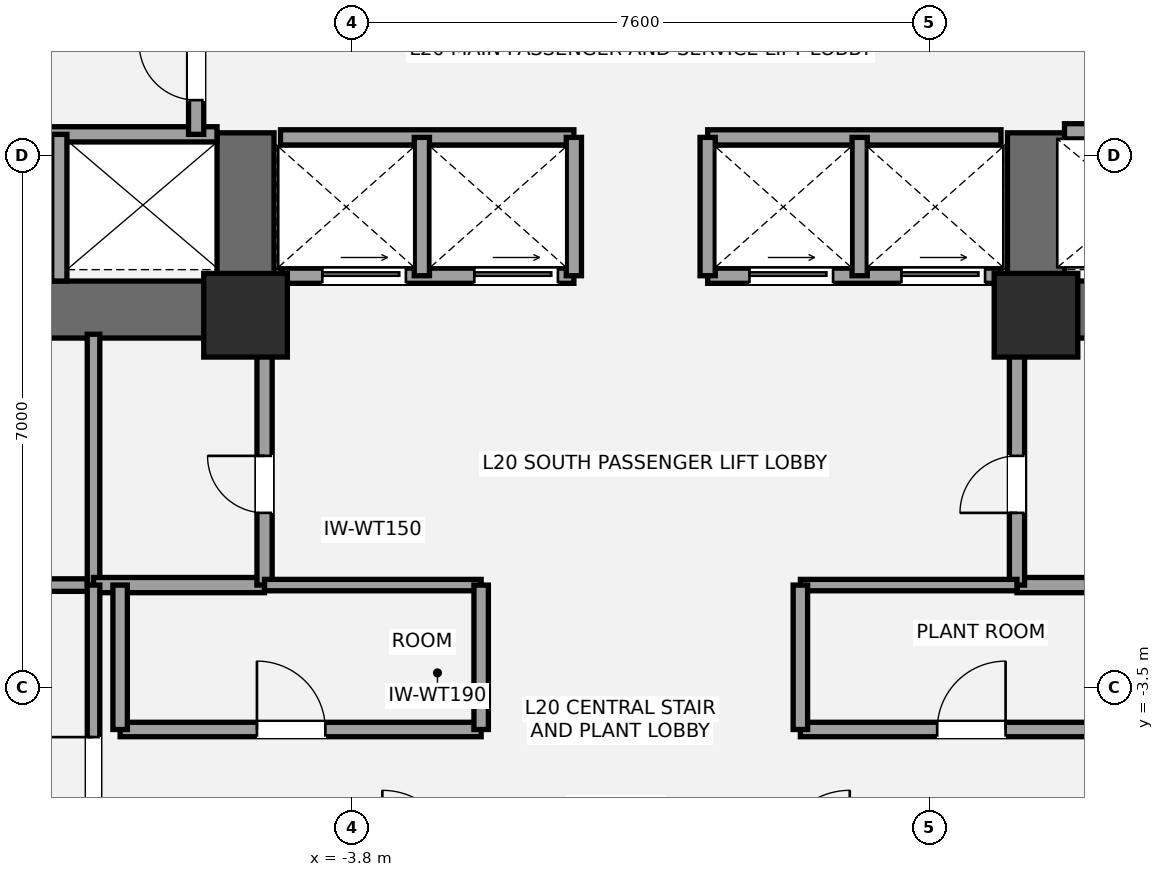
"""IFC4 building model, lengths in metres.
Left out: names, types, materials, properties, quantities, classifications, styles, units other than length and angle.
Written with IfcOpenShell. Run it as: python <this file> out.ifc"""

import sys

from ifc_helpers import new_model, si_unit, direction, frame, frame_2d, origin, origin_2d, place, context, subcontext, project, spatial, rectangle, extrude, element, fill, save


model = new_model("IFC4")
c1 = context("Model", 3, precision=1e-05, world=origin(), true_north=direction((0.0, 1.0)))
c2 = subcontext(c1, "Body", "Model", "MODEL_VIEW")
j1 = project(units=[si_unit("LENGTHUNIT", "METRE"), si_unit("PLANEANGLEUNIT", "RADIAN")], contexts=[c1])
p1 = place(None, origin())
s1 = spatial("IfcSite", under=j1, at=p1, CompositionType="ELEMENT")
p2 = place(p1, origin())
s2 = spatial("IfcBuilding", under=s1, at=p2, CompositionType="ELEMENT")
p3 = place(p2, frame((0.0, 0.0, 77.4)))
s3 = spatial("IfcBuildingStorey", under=s2, at=p3, CompositionType="ELEMENT", Elevation=77.4)
p4 = place(p3, frame((-4.825, 1.475, 0.0), z_axis=(0.0, 0.0, 1.0), x_axis=(-1.0, 0.0, 0.0)))
e1 = element("IfcWall", 1, at=p4, inside=s3, PredefinedType="SHEAR", context=c2, shape_type="SweptSolid", body=[
    extrude(rectangle(XDim=9.075, YDim=0.75, at=frame_2d((4.538, 0.0))), origin(), (0.0, 0.0, 1.0), 4.5),
])
p5 = place(p4, frame((5.355, 0.0, 0.0)))
e2 = element("IfcOpeningElement", 2, at=p5, cuts=e1, PredefinedType="OPENING", context=c2, shape_type="SweptSolid", body=[
    extrude(rectangle(XDim=1.05, YDim=2.15, at=frame_2d((0.525, 1.075))), frame((0.0, 0.385, 0.0), z_axis=(0.0, -1.0, 0.0), x_axis=(1.0, 0.0, 0.0)), (0.0, 0.0, 1.0), 0.77),
])
p6 = place(p4, frame((3.805, 0.0, 0.0)))
e3 = element("IfcOpeningElement", 3, at=p6, cuts=e1, PredefinedType="OPENING", context=c2, shape_type="SweptSolid", body=[
    extrude(rectangle(XDim=1.1, YDim=2.2, at=frame_2d((0.55, 1.1))), frame((0.0, 0.385, 0.0), z_axis=(0.0, -1.0, 0.0), x_axis=(1.0, 0.0, 0.0)), (0.0, 0.0, 1.0), 0.77),
])
p7 = place(p3, frame((-5.2, 1.1, 0.0), z_axis=(0.0, 0.0, 1.0), x_axis=(0.0, 1.0, 0.0)))
e4 = element("IfcWall", 4, at=p7, inside=s3, PredefinedType="SHEAR", context=c2, shape_type="SweptSolid", body=[
    extrude(rectangle(XDim=2.7, YDim=0.75, at=frame_2d((1.35, 0.0))), origin(), (0.0, 0.0, 1.0), 4.5),
])
p8 = place(p3, frame((13.9, 1.475, 0.0), z_axis=(0.0, 0.0, 1.0), x_axis=(-1.0, 0.0, 0.0)))
e5 = element("IfcWall", 5, at=p8, inside=s3, PredefinedType="SHEAR", context=c2, shape_type="SweptSolid", body=[
    extrude(rectangle(XDim=9.075, YDim=0.75, at=frame_2d((4.538, 0.0))), origin(), (0.0, 0.0, 1.0), 4.5),
])
p9 = place(p8, frame((2.67, 0.0, 0.0)))
e6 = element("IfcOpeningElement", 6, at=p9, cuts=e5, PredefinedType="OPENING", context=c2, shape_type="SweptSolid", body=[
    extrude(rectangle(XDim=1.05, YDim=2.15, at=frame_2d((0.525, 1.075))), frame((0.0, 0.385, 0.0), z_axis=(0.0, -1.0, 0.0), x_axis=(1.0, 0.0, 0.0)), (0.0, 0.0, 1.0), 0.77),
])
p10 = place(p8, frame((4.55, 0.0, 0.0)))
e7 = element("IfcOpeningElement", 7, at=p10, cuts=e5, PredefinedType="OPENING", context=c2, shape_type="SweptSolid", body=[
    extrude(rectangle(XDim=1.1, YDim=2.2, at=frame_2d((0.55, 1.1))), frame((0.0, 0.385, 0.0), z_axis=(0.0, -1.0, 0.0), x_axis=(1.0, 0.0, 0.0)), (0.0, 0.0, 1.0), 0.77),
])
p11 = place(p3, frame((5.2, 1.1, 0.0), z_axis=(0.0, 0.0, 1.0), x_axis=(0.0, 1.0, 0.0)))
e8 = element("IfcWall", 8, at=p11, inside=s3, PredefinedType="SHEAR", context=c2, shape_type="SweptSolid", body=[
    extrude(rectangle(XDim=2.7, YDim=0.75, at=frame_2d((1.35, 0.0))), origin(), (0.0, 0.0, 1.0), 4.5),
])
for number, where, z_axis, x_axis in (
    (9, (-5.2, 1.4, 0.0), (0.0, 0.0, 1.0), (1.0, 0.0, 0.0)),
    (10, (5.2, 1.4, 0.0), (0.0, 0.0, 1.0), (1.0, 0.0, 0.0)),
):
    element("IfcColumn", number, at=place(p3, frame(where, z_axis=z_axis, x_axis=x_axis)), inside=s3, PredefinedType="COLUMN", context=c2, shape_type="SweptSolid", body=[
        extrude(rectangle(XDim=1.1, YDim=1.1, at=origin_2d()), origin(), (0.0, 0.0, 1.0), 4.5),
    ])
p12 = place(p3, frame((-13.45, -2.15, 0.0), z_axis=(0.0, 0.0, 1.0), x_axis=(1.0, 0.0, 0.0)))
e11 = element("IfcWall", 11, at=p12, inside=s3, PredefinedType="PARTITIONING", context=c2, shape_type="SweptSolid", body=[
    extrude(rectangle(XDim=6.25, YDim=0.165, at=frame_2d((3.125, 0.0))), origin(), (0.0, 0.0, 1.0), 3.733),
])
p13 = place(p12, frame((2.6, 0.0, 0.0)))
e12 = element("IfcOpeningElement", 12, at=p13, cuts=e11, PredefinedType="OPENING", context=c2, shape_type="SweptSolid", body=[
    extrude(rectangle(XDim=1.05, YDim=2.15, at=frame_2d((0.525, 1.075))), frame((0.0, 0.093, 0.0), z_axis=(0.0, -1.0, 0.0), x_axis=(1.0, 0.0, 0.0)), (0.0, 0.0, 1.0), 0.185),
])
p14 = place(p3, frame((-7.2, -2.15, 0.0), z_axis=(0.0, 0.0, 1.0), x_axis=(0.0, 1.0, 0.0)))
e13 = element("IfcWall", 13, at=p14, inside=s3, PredefinedType="PARTITIONING", context=c2, shape_type="SweptSolid", body=[
    extrude(rectangle(XDim=3.3, YDim=0.165, at=frame_2d((1.65, 0.0))), origin(), (0.0, 0.0, 1.0), 3.733),
])
p15 = place(p3, frame((-7.2, -2.15, 0.0), z_axis=(0.0, 0.0, 1.0), x_axis=(1.0, 0.0, 0.0)))
e14 = element("IfcWall", 14, at=p15, inside=s3, PredefinedType="SOLIDWALL", context=c2, shape_type="SweptSolid", body=[
    extrude(rectangle(XDim=2.25, YDim=0.2, at=frame_2d((1.125, 0.0))), origin(), (0.0, 0.0, 1.0), 2.47),
])
p16 = place(p3, frame((-4.95, -2.15, 0.0), z_axis=(0.0, 0.0, 1.0), x_axis=(0.0, 1.0, 0.0)))
e15 = element("IfcWall", 15, at=p16, inside=s3, PredefinedType="SOLIDWALL", context=c2, shape_type="SweptSolid", body=[
    extrude(rectangle(XDim=3.3, YDim=0.2, at=frame_2d((1.65, 0.0))), origin(), (0.0, 0.0, 1.0), 2.47),
])
p17 = place(p16, frame((0.95, 0.0, 0.0)))
e16 = element("IfcOpeningElement", 16, at=p17, cuts=e15, PredefinedType="OPENING", context=c2, shape_type="SweptSolid", body=[
    extrude(rectangle(XDim=0.75, YDim=2.1, at=frame_2d((0.375, 1.05))), frame((0.0, 0.11, 0.0), z_axis=(0.0, -1.0, 0.0), x_axis=(1.0, 0.0, 0.0)), (0.0, 0.0, 1.0), 0.22),
])
p18 = place(p3, frame((4.95, -2.15, 0.0), z_axis=(0.0, 0.0, 1.0), x_axis=(1.0, 0.0, 0.0)))
e17 = element("IfcWall", 17, at=p18, inside=s3, PredefinedType="SOLIDWALL", context=c2, shape_type="SweptSolid", body=[
    extrude(rectangle(XDim=2.25, YDim=0.2, at=frame_2d((1.125, 0.0))), origin(), (0.0, 0.0, 1.0), 2.47),
])
p19 = place(p3, frame((4.95, -2.15, 0.0), z_axis=(0.0, 0.0, 1.0), x_axis=(0.0, 1.0, 0.0)))
e18 = element("IfcWall", 18, at=p19, inside=s3, PredefinedType="SOLIDWALL", context=c2, shape_type="SweptSolid", body=[
    extrude(rectangle(XDim=3.3, YDim=0.2, at=frame_2d((1.65, 0.0))), origin(), (0.0, 0.0, 1.0), 2.47),
])
p20 = place(p19, frame((0.95, 0.0, 0.0)))
e19 = element("IfcOpeningElement", 19, at=p20, cuts=e18, PredefinedType="OPENING", context=c2, shape_type="SweptSolid", body=[
    extrude(rectangle(XDim=0.75, YDim=2.1, at=frame_2d((0.375, 1.05))), frame((0.0, 0.11, 0.0), z_axis=(0.0, -1.0, 0.0), x_axis=(1.0, 0.0, 0.0)), (0.0, 0.0, 1.0), 0.22),
])
p21 = place(p3, frame((-9.78, 3.78, 0.0), z_axis=(0.0, 0.0, 1.0), x_axis=(1.0, 0.0, 0.0)))
e20 = element("IfcWall", 20, at=p21, inside=s3, PredefinedType="SOLIDWALL", context=c2, shape_type="SweptSolid", body=[
    extrude(rectangle(XDim=4.205, YDim=0.2, at=frame_2d((2.103, 0.0))), origin(), (0.0, 0.0, 1.0), 4.28),
])
p22 = place(p3, frame((-7.65, 1.85, 0.0), z_axis=(0.0, 0.0, 1.0), x_axis=(0.0, 1.0, 0.0)))
e21 = element("IfcWall", 21, at=p22, inside=s3, PredefinedType="SOLIDWALL", context=c2, shape_type="SweptSolid", body=[
    extrude(rectangle(XDim=1.93, YDim=0.2, at=frame_2d((0.965, 0.0))), origin(), (0.0, 0.0, 1.0), 4.28),
])
p23 = place(p3, frame((-5.85, 3.78, 0.0), z_axis=(0.0, 0.0, 1.0), x_axis=(0.0, 1.0, 0.0)))
e22 = element("IfcWall", 22, at=p23, inside=s3, PredefinedType="SOLIDWALL", context=c2, shape_type="SweptSolid", body=[
    extrude(rectangle(XDim=1.69, YDim=0.2, at=frame_2d((0.845, 0.0))), origin(), (0.0, 0.0, 1.0), 4.28),
])
p24 = place(p23, frame((0.45, 0.0, 0.0)))
e23 = element("IfcOpeningElement", 23, at=p24, cuts=e22, PredefinedType="OPENING", context=c2, shape_type="SweptSolid", body=[
    extrude(rectangle(XDim=0.75, YDim=2.1, at=frame_2d((0.375, 1.05))), frame((0.0, 0.11, 0.0), z_axis=(0.0, -1.0, 0.0), x_axis=(1.0, 0.0, 0.0)), (0.0, 0.0, 1.0), 0.22),
])
p25 = place(p3, frame((5.575, 3.82, 0.0), z_axis=(0.0, 0.0, 1.0), x_axis=(1.0, 0.0, 0.0)))
e24 = element("IfcWall", 24, at=p25, inside=s3, PredefinedType="SOLIDWALL", context=c2, shape_type="SweptSolid", body=[
    extrude(rectangle(XDim=4.205, YDim=0.2, at=frame_2d((2.103, 0.0))), origin(), (0.0, 0.0, 1.0), 4.28),
])
p26 = place(p25, frame((0.65, 0.0, 0.0)))
e25 = element("IfcOpeningElement", 25, at=p26, cuts=e24, PredefinedType="OPENING", context=c2, shape_type="SweptSolid", body=[
    extrude(rectangle(XDim=1.2, YDim=2.2, at=frame_2d((0.6, 1.1))), frame((0.0, 0.11, 0.0), z_axis=(0.0, -1.0, 0.0), x_axis=(1.0, 0.0, 0.0)), (0.0, 0.0, 1.0), 0.22),
])
p27 = place(p3, frame((-4.74, 1.92, 0.0), z_axis=(0.0, 0.0, 1.0), x_axis=(1.0, 0.0, 0.0)))
e26 = element("IfcWall", 26, at=p27, inside=s3, PredefinedType="SOLIDWALL", context=c2, shape_type="SweptSolid", body=[
    extrude(rectangle(XDim=3.86, YDim=0.2, at=frame_2d((1.93, 0.0))), origin(), (0.0, 0.0, 1.0), 3.27),
])
p28 = place(p27, frame((0.55, 0.0, 0.0)))
e27 = element("IfcOpeningElement", 27, at=p28, cuts=e26, PredefinedType="OPENING", context=c2, shape_type="SweptSolid", body=[
    extrude(rectangle(XDim=1.1, YDim=2.2, at=frame_2d((0.55, 1.1))), frame((0.0, 0.11, 0.0), z_axis=(0.0, -1.0, 0.0), x_axis=(1.0, 0.0, 0.0)), (0.0, 0.0, 1.0), 0.22),
])
p29 = place(p27, frame((2.55, 0.0, 0.0)))
e28 = element("IfcOpeningElement", 28, at=p29, cuts=e26, PredefinedType="OPENING", context=c2, shape_type="SweptSolid", body=[
    extrude(rectangle(XDim=1.1, YDim=2.2, at=frame_2d((0.55, 1.1))), frame((0.0, 0.11, 0.0), z_axis=(0.0, -1.0, 0.0), x_axis=(1.0, 0.0, 0.0)), (0.0, 0.0, 1.0), 0.22),
])
p30 = place(p3, frame((0.88, 1.92, 0.0), z_axis=(0.0, 0.0, 1.0), x_axis=(1.0, 0.0, 0.0)))
e29 = element("IfcWall", 29, at=p30, inside=s3, PredefinedType="SOLIDWALL", context=c2, shape_type="SweptSolid", body=[
    extrude(rectangle(XDim=3.86, YDim=0.2, at=frame_2d((1.93, 0.0))), origin(), (0.0, 0.0, 1.0), 3.27),
])
p31 = place(p30, frame((0.55, 0.0, 0.0)))
e30 = element("IfcOpeningElement", 30, at=p31, cuts=e29, PredefinedType="OPENING", context=c2, shape_type="SweptSolid", body=[
    extrude(rectangle(XDim=1.1, YDim=2.2, at=frame_2d((0.55, 1.1))), frame((0.0, 0.11, 0.0), z_axis=(0.0, -1.0, 0.0), x_axis=(1.0, 0.0, 0.0)), (0.0, 0.0, 1.0), 0.22),
])
p32 = place(p30, frame((2.55, 0.0, 0.0)))
e31 = element("IfcOpeningElement", 31, at=p32, cuts=e29, PredefinedType="OPENING", context=c2, shape_type="SweptSolid", body=[
    extrude(rectangle(XDim=1.1, YDim=2.2, at=frame_2d((0.55, 1.1))), frame((0.0, 0.11, 0.0), z_axis=(0.0, -1.0, 0.0), x_axis=(1.0, 0.0, 0.0)), (0.0, 0.0, 1.0), 0.22),
])
for number, where, z_axis, x_axis in (
    (32, (-4.74, 3.74, 0.0), (0.0, 0.0, 1.0), (1.0, 0.0, 0.0)),
    (33, (0.88, 3.74, 0.0), (0.0, 0.0, 1.0), (1.0, 0.0, 0.0)),
):
    element("IfcWall", number, at=place(p3, frame(where, z_axis=z_axis, x_axis=x_axis)), inside=s3, PredefinedType="SOLIDWALL", context=c2, shape_type="SweptSolid", body=[
        extrude(rectangle(XDim=3.86, YDim=0.2, at=frame_2d((1.93, 0.0))), origin(), (0.0, 0.0, 1.0), 4.28),
    ])
for number, where, z_axis, x_axis in (
    (34, (-2.88, 1.92, 0.0), (0.0, 0.0, 1.0), (0.0, 1.0, 0.0)),
    (35, (2.88, 1.92, 0.0), (0.0, 0.0, 1.0), (0.0, 1.0, 0.0)),
    (36, (-0.88, 1.92, 0.0), (0.0, 0.0, 1.0), (0.0, 1.0, 0.0)),
    (37, (0.88, 1.92, 0.0), (0.0, 0.0, 1.0), (0.0, 1.0, 0.0)),
):
    element("IfcWall", number, at=place(p3, frame(where, z_axis=z_axis, x_axis=x_axis)), inside=s3, PredefinedType="SOLIDWALL", context=c2, shape_type="SweptSolid", body=[
        extrude(rectangle(XDim=1.82, YDim=0.2, at=frame_2d((0.91, 0.0))), origin(), (0.0, 0.0, 1.0), 4.28),
    ])
p33 = place(p3, frame((-6.85, -4.05, 0.0), z_axis=(0.0, 0.0, 1.0), x_axis=(1.0, 0.0, 0.0)))
e38 = element("IfcWall", 38, at=p33, inside=s3, PredefinedType="PLUMBINGWALL", context=c2, shape_type="SweptSolid", body=[
    extrude(rectangle(XDim=4.75, YDim=0.19, at=frame_2d((2.375, 0.0))), origin(), (0.0, 0.0, 1.0), 2.47),
])
p34 = place(p33, frame((1.8, 0.0, 0.0)))
e39 = element("IfcOpeningElement", 39, at=p34, cuts=e38, PredefinedType="OPENING", context=c2, shape_type="SweptSolid", body=[
    extrude(rectangle(XDim=0.9, YDim=2.1, at=frame_2d((0.45, 1.05))), frame((0.0, 0.105, 0.0), z_axis=(0.0, -1.0, 0.0), x_axis=(1.0, 0.0, 0.0)), (0.0, 0.0, 1.0), 0.21),
])
p35 = place(p3, frame((-4.95, -2.15, 0.0), z_axis=(0.0, 0.0, 1.0), x_axis=(1.0, 0.0, 0.0)))
e40 = element("IfcWall", 40, at=p35, inside=s3, PredefinedType="PLUMBINGWALL", context=c2, shape_type="SweptSolid", body=[
    extrude(rectangle(XDim=2.85, YDim=0.15, at=frame_2d((1.425, 0.0))), origin(), (0.0, 0.0, 1.0), 4.28),
])
for number, where, z_axis, x_axis in (
    (41, (-6.85, -4.05, 0.0), (0.0, 0.0, 1.0), (0.0, 1.0, 0.0)),
    (42, (-2.1, -4.05, 0.0), (0.0, 0.0, 1.0), (0.0, 1.0, 0.0)),
):
    element("IfcWall", number, at=place(p3, frame(where, z_axis=z_axis, x_axis=x_axis)), inside=s3, PredefinedType="PLUMBINGWALL", context=c2, shape_type="SweptSolid", body=[
        extrude(rectangle(XDim=1.9, YDim=0.19, at=frame_2d((0.95, 0.0))), origin(), (0.0, 0.0, 1.0), 4.28),
    ])
p36 = place(p3, frame((2.1, -4.05, 0.0), z_axis=(0.0, 0.0, 1.0), x_axis=(1.0, 0.0, 0.0)))
e43 = element("IfcWall", 43, at=p36, inside=s3, PredefinedType="PLUMBINGWALL", context=c2, shape_type="SweptSolid", body=[
    extrude(rectangle(XDim=4.75, YDim=0.19, at=frame_2d((2.375, 0.0))), origin(), (0.0, 0.0, 1.0), 2.47),
])
p37 = place(p36, frame((1.8, 0.0, 0.0)))
e44 = element("IfcOpeningElement", 44, at=p37, cuts=e43, PredefinedType="OPENING", context=c2, shape_type="SweptSolid", body=[
    extrude(rectangle(XDim=0.9, YDim=2.1, at=frame_2d((0.45, 1.05))), frame((0.0, 0.105, 0.0), z_axis=(0.0, -1.0, 0.0), x_axis=(1.0, 0.0, 0.0)), (0.0, 0.0, 1.0), 0.21),
])
p38 = place(p3, frame((2.1, -2.15, 0.0), z_axis=(0.0, 0.0, 1.0), x_axis=(1.0, 0.0, 0.0)))
e45 = element("IfcWall", 45, at=p38, inside=s3, PredefinedType="PLUMBINGWALL", context=c2, shape_type="SweptSolid", body=[
    extrude(rectangle(XDim=2.85, YDim=0.15, at=frame_2d((1.425, 0.0))), origin(), (0.0, 0.0, 1.0), 4.28),
])
p39 = place(p3, frame((2.1, -4.05, 0.0), z_axis=(0.0, 0.0, 1.0), x_axis=(0.0, 1.0, 0.0)))
e46 = element("IfcWall", 46, at=p39, inside=s3, PredefinedType="PLUMBINGWALL", context=c2, shape_type="SweptSolid", body=[
    extrude(rectangle(XDim=1.9, YDim=0.19, at=frame_2d((0.95, 0.0))), origin(), (0.0, 0.0, 1.0), 4.28),
])
p40 = place(p3, frame((-7.2, -5.8, 0.0), z_axis=(0.0, 0.0, 1.0), x_axis=(0.0, 1.0, 0.0)))
e47 = element("IfcWall", 47, at=p40, inside=s3, PredefinedType="PARTITIONING", context=c2, shape_type="SweptSolid", body=[
    extrude(rectangle(XDim=3.65, YDim=0.165, at=frame_2d((1.825, 0.0))), origin(), (0.0, 0.0, 1.0), 4.28),
])
p41 = place(p40, frame((0.6, 0.0, 0.0)))
e48 = element("IfcOpeningElement", 48, at=p41, cuts=e47, PredefinedType="OPENING", context=c2, shape_type="SweptSolid", body=[
    extrude(rectangle(XDim=1.05, YDim=2.15, at=frame_2d((0.525, 1.075))), frame((0.0, 0.093, 0.0), z_axis=(0.0, -1.0, 0.0), x_axis=(1.0, 0.0, 0.0)), (0.0, 0.0, 1.0), 0.185),
])
p42 = place(p17, origin())
e49 = element("IfcDoor", 49, at=p42, inside=s3, OperationType="SINGLE_SWING_RIGHT", PredefinedType="DOOR", context=c2, shape_type="SweptSolid", body=[
    extrude(rectangle(XDim=0.75, YDim=2.1, at=frame_2d((0.375, 1.05))), frame((0.0, 0.025, 0.0), z_axis=(0.0, -1.0, 0.0), x_axis=(1.0, 0.0, 0.0)), (0.0, 0.0, 1.0), 0.05),
])
fill(e16, e49)
p43 = place(p20, origin())
e50 = element("IfcDoor", 50, at=p43, inside=s3, OperationType="SINGLE_SWING_LEFT", PredefinedType="DOOR", context=c2, shape_type="SweptSolid", body=[
    extrude(rectangle(XDim=0.75, YDim=2.1, at=frame_2d((0.375, 1.05))), frame((0.0, 0.025, 0.0), z_axis=(0.0, -1.0, 0.0), x_axis=(1.0, 0.0, 0.0)), (0.0, 0.0, 1.0), 0.05),
])
fill(e19, e50)
p44 = place(p24, origin())
e51 = element("IfcDoor", 51, at=p44, inside=s3, OperationType="SINGLE_SWING_RIGHT", PredefinedType="DOOR", context=c2, shape_type="SweptSolid", body=[
    extrude(rectangle(XDim=0.75, YDim=2.1, at=frame_2d((0.375, 1.05))), frame((0.0, 0.025, 0.0), z_axis=(0.0, -1.0, 0.0), x_axis=(1.0, 0.0, 0.0)), (0.0, 0.0, 1.0), 0.05),
])
fill(e23, e51)
p45 = place(p28, origin())
e52 = element("IfcDoor", 52, at=p45, inside=s3, OperationType="SLIDING_TO_LEFT", PredefinedType="DOOR", context=c2, shape_type="SweptSolid", body=[
    extrude(rectangle(XDim=1.1, YDim=2.2, at=frame_2d((0.55, 1.1))), frame((0.0, 0.025, 0.0), z_axis=(0.0, -1.0, 0.0), x_axis=(1.0, 0.0, 0.0)), (0.0, 0.0, 1.0), 0.05),
])
fill(e27, e52)
p46 = place(p29, origin())
e53 = element("IfcDoor", 53, at=p46, inside=s3, OperationType="SLIDING_TO_LEFT", PredefinedType="DOOR", context=c2, shape_type="SweptSolid", body=[
    extrude(rectangle(XDim=1.1, YDim=2.2, at=frame_2d((0.55, 1.1))), frame((0.0, 0.025, 0.0), z_axis=(0.0, -1.0, 0.0), x_axis=(1.0, 0.0, 0.0)), (0.0, 0.0, 1.0), 0.05),
])
fill(e28, e53)
p47 = place(p31, origin())
e54 = element("IfcDoor", 54, at=p47, inside=s3, OperationType="SLIDING_TO_LEFT", PredefinedType="DOOR", context=c2, shape_type="SweptSolid", body=[
    extrude(rectangle(XDim=1.1, YDim=2.2, at=frame_2d((0.55, 1.1))), frame((0.0, 0.025, 0.0), z_axis=(0.0, -1.0, 0.0), x_axis=(1.0, 0.0, 0.0)), (0.0, 0.0, 1.0), 0.05),
])
fill(e30, e54)
p48 = place(p32, origin())
e55 = element("IfcDoor", 55, at=p48, inside=s3, OperationType="SLIDING_TO_LEFT", PredefinedType="DOOR", context=c2, shape_type="SweptSolid", body=[
    extrude(rectangle(XDim=1.1, YDim=2.2, at=frame_2d((0.55, 1.1))), frame((0.0, 0.025, 0.0), z_axis=(0.0, -1.0, 0.0), x_axis=(1.0, 0.0, 0.0)), (0.0, 0.0, 1.0), 0.05),
])
fill(e31, e55)
p49 = place(p34, origin())
e56 = element("IfcDoor", 56, at=p49, inside=s3, OperationType="SINGLE_SWING_LEFT", PredefinedType="DOOR", context=c2, shape_type="SweptSolid", body=[
    extrude(rectangle(XDim=0.9, YDim=2.1, at=frame_2d((0.45, 1.05))), frame((0.0, 0.025, 0.0), z_axis=(0.0, -1.0, 0.0), x_axis=(1.0, 0.0, 0.0)), (0.0, 0.0, 1.0), 0.05),
])
fill(e39, e56)
p50 = place(p37, origin())
e57 = element("IfcDoor", 57, at=p50, inside=s3, OperationType="SINGLE_SWING_RIGHT", PredefinedType="DOOR", context=c2, shape_type="SweptSolid", body=[
    extrude(rectangle(XDim=0.9, YDim=2.1, at=frame_2d((0.45, 1.05))), frame((0.0, 0.025, 0.0), z_axis=(0.0, -1.0, 0.0), x_axis=(1.0, 0.0, 0.0)), (0.0, 0.0, 1.0), 0.05),
])
fill(e44, e57)
p51 = place(p41, origin())
e58 = element("IfcDoor", 58, at=p51, inside=s3, OperationType="SINGLE_SWING_RIGHT", PredefinedType="DOOR", context=c2, shape_type="SweptSolid", body=[
    extrude(rectangle(XDim=1.05, YDim=2.15, at=frame_2d((0.525, 1.075))), frame((0.0, 0.025, 0.0), z_axis=(0.0, -1.0, 0.0), x_axis=(1.0, 0.0, 0.0)), (0.0, 0.0, 1.0), 0.05),
])
fill(e48, e58)
save(model, sys.argv[1])
